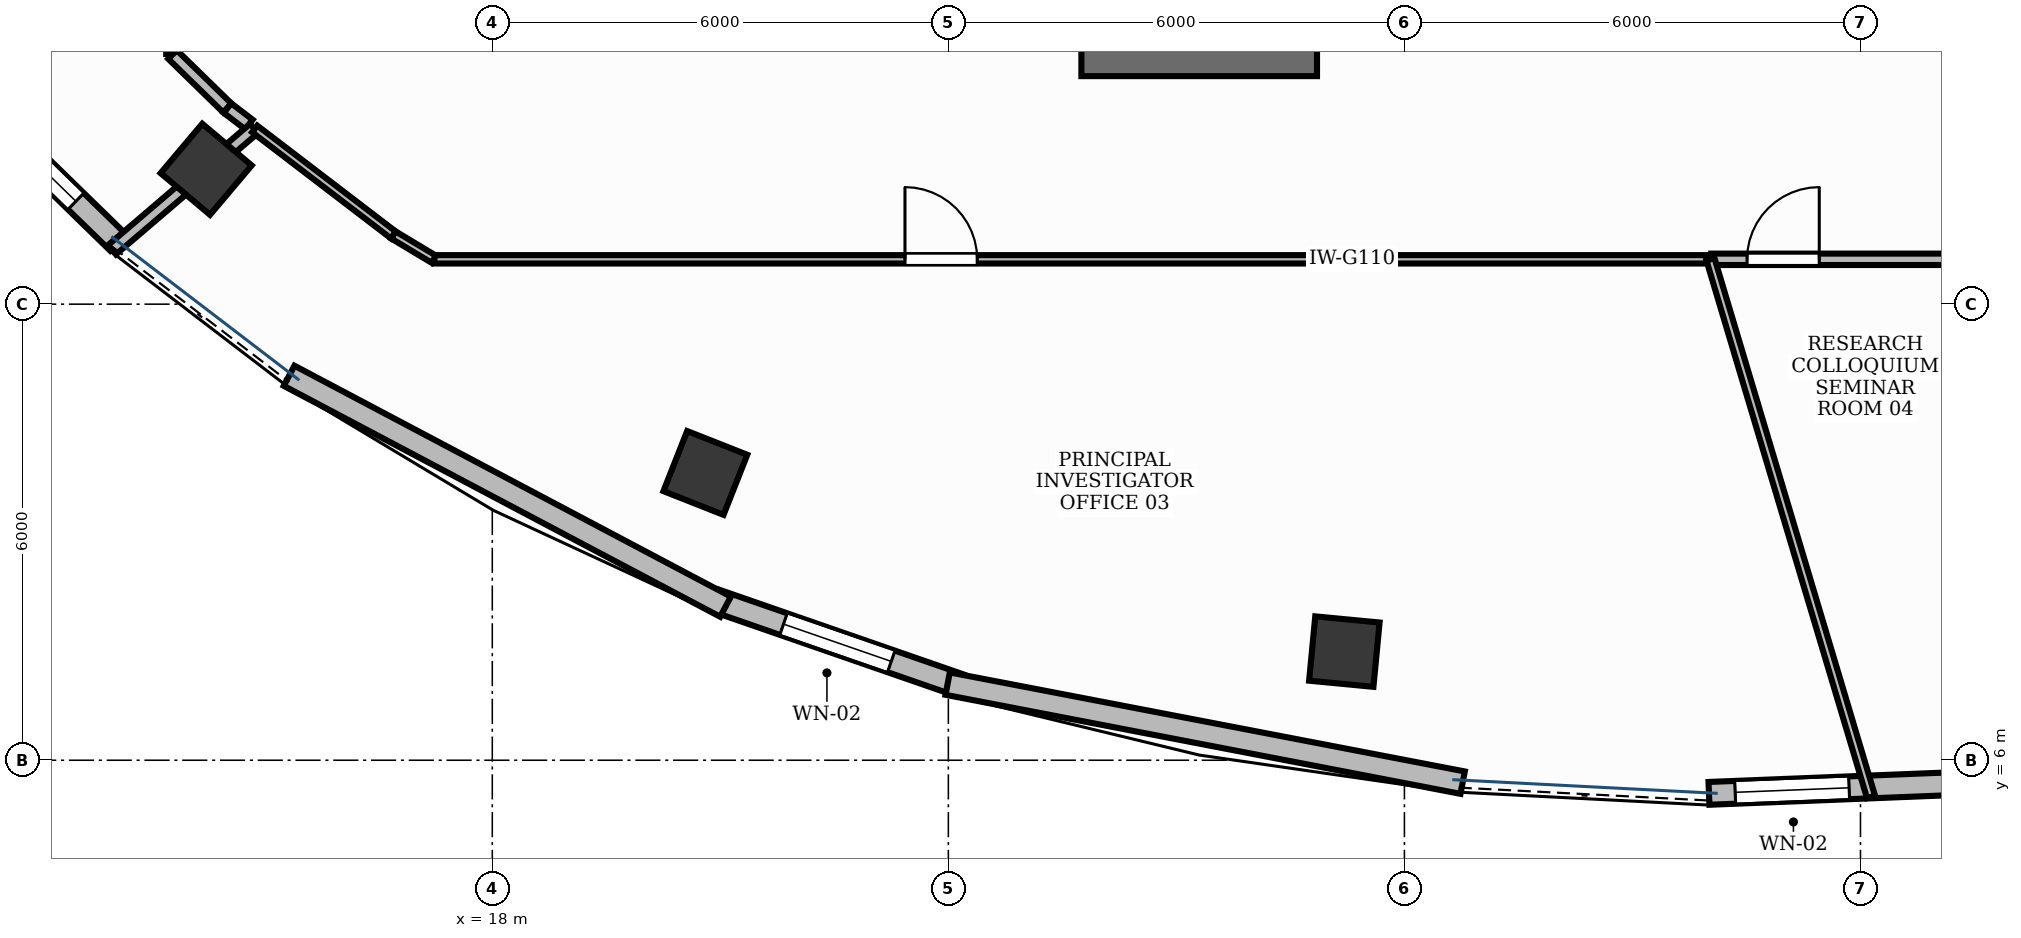
"""IFC4 building model, lengths in metres.
Left out: names, types, materials, properties, quantities, classifications, styles, units other than length and angle.
Written with IfcOpenShell. Run it as: python <this file> out.ifc"""

import sys

from ifc_helpers import new_model, si_unit, direction, frame, frame_2d, origin, origin_2d, place, context, subcontext, project, spatial, rectangle, extrude, element, fill, save


model = new_model("IFC4")
c1 = context("Model", 3, precision=1e-05, world=origin(), true_north=direction((0.0, 1.0)))
c2 = subcontext(c1, "Body", "Model", "MODEL_VIEW")
j1 = project(units=[si_unit("LENGTHUNIT", "METRE"), si_unit("PLANEANGLEUNIT", "RADIAN")], contexts=[c1])
p1 = place(None, origin())
s1 = spatial("IfcSite", under=j1, at=p1, CompositionType="ELEMENT")
p2 = place(p1, origin())
s2 = spatial("IfcBuilding", under=s1, at=p2, CompositionType="ELEMENT")
p3 = place(p2, frame((0.0, 0.0, 243.6)))
s3 = spatial("IfcBuildingStorey", under=s2, at=p3, CompositionType="ELEMENT", Elevation=243.6)
p4 = place(p3, frame((25.75, 15.2, 0.0), z_axis=(0.0, 0.0, 1.0), x_axis=(1.0, 0.0, 0.0)))
e1 = element("IfcWall", 1, at=p4, inside=s3, PredefinedType="SHEAR", context=c2, shape_type="SweptSolid", body=[
    extrude(rectangle(XDim=3.1, YDim=0.4, at=frame_2d((1.55, 0.0))), origin(), (0.0, 0.0, 1.0), 3.9),
])
for number, where, z_axis, x_axis in (
    (2, (14.235, 13.775, -0.0), (0.0, 0.0, 1.0), (-0.764, 0.645, 0.0)),
    (3, (20.803, 9.78, -0.0), (0.0, 0.0, 1.0), (-0.93, 0.367, 0.0)),
    (4, (29.21, 7.429, -0.0), (0.0, 0.0, 1.0), (-0.995, 0.095, 0.0)),
):
    element("IfcColumn", number, at=place(p3, frame(where, z_axis=z_axis, x_axis=x_axis)), inside=s3, PredefinedType="COLUMN", context=c2, shape_type="SweptSolid", body=[
        extrude(rectangle(XDim=0.85, YDim=0.85, at=origin_2d()), origin(), (0.0, 0.0, 1.0), 3.901),
    ])
p5 = place(p3, frame((10.892, 14.943, 0.0), z_axis=(0.0, 0.0, 1.0), x_axis=(0.716005135245, -0.698095012375, 0.0)))
e5 = element("IfcWall", 5, at=p5, inside=s3, PredefinedType="STANDARD", context=c2, shape_type="SweptSolid", body=[
    extrude(rectangle(XDim=3.053, YDim=0.3, at=frame_2d((1.527, 0.0))), origin(), (0.0, 0.0, 1.0), 3.9),
])
p6 = place(p5, frame((0.777, 0.0, 0.95)))
e6 = element("IfcOpeningElement", 6, at=p6, cuts=e5, PredefinedType="OPENING", context=c2, shape_type="SweptSolid", body=[
    extrude(rectangle(XDim=1.5, YDim=1.8, at=frame_2d((0.75, 0.9))), frame((0.0, 0.165, 0.0), z_axis=(0.0, -1.0, 0.0), x_axis=(1.0, 0.0, 0.0)), (0.0, 0.0, 1.0), 0.33),
])
p7 = place(p3, frame((20.928, 8.104, 0.0), z_axis=(0.0, 0.0, 1.0), x_axis=(0.944837969822, -0.327538105849, 0.0)))
e7 = element("IfcWall", 7, at=p7, inside=s3, PredefinedType="STANDARD", context=c2, shape_type="SweptSolid", body=[
    extrude(rectangle(XDim=3.412, YDim=0.3, at=frame_2d((1.706, 0.0))), origin(), (0.0, 0.0, 1.0), 3.47),
])
p8 = place(p7, frame((0.956, 0.0, 0.95)))
e8 = element("IfcOpeningElement", 8, at=p8, cuts=e7, PredefinedType="OPENING", context=c2, shape_type="SweptSolid", body=[
    extrude(rectangle(XDim=1.5, YDim=1.8, at=frame_2d((0.75, 0.9))), frame((0.0, 0.165, 0.0), z_axis=(0.0, -1.0, 0.0), x_axis=(1.0, 0.0, 0.0)), (0.0, 0.0, 1.0), 0.33),
])
p9 = place(p3, frame((34.007, 5.564, 0.0), z_axis=(0.0, 0.0, 1.0), x_axis=(0.999212491376, 0.039678672827, 0.0)))
e9 = element("IfcWall", 9, at=p9, inside=s3, PredefinedType="STANDARD", context=c2, shape_type="SweptSolid", body=[
    extrude(rectangle(XDim=3.538, YDim=0.3, at=frame_2d((1.769, 0.0))), origin(), (0.0, 0.0, 1.0), 3.9),
])
p10 = place(p9, frame((0.345, 0.0, 0.95)))
e10 = element("IfcOpeningElement", 10, at=p10, cuts=e9, PredefinedType="OPENING", context=c2, shape_type="SweptSolid", body=[
    extrude(rectangle(XDim=1.5, YDim=1.8, at=frame_2d((0.75, 0.9))), frame((0.0, 0.165, 0.0), z_axis=(0.0, -1.0, 0.0), x_axis=(1.0, 0.0, 0.0)), (0.0, 0.0, 1.0), 0.33),
])
p11 = place(p3, frame((15.327, 11.058, 0.0), z_axis=(0.0, 0.0, 1.0), x_axis=(0.883907649271, -0.467661488216, 0.0)))
e11 = element("IfcWall", 11, at=p11, inside=s3, PredefinedType="STANDARD", context=c2, shape_type="SweptSolid", body=[
    extrude(rectangle(XDim=6.496, YDim=0.3, at=frame_2d((3.248, 0.0))), origin(), (0.0, 0.0, 1.0), 3.9),
])
p12 = place(p3, frame((23.991, 7.008, 0.0), z_axis=(0.0, 0.0, 1.0), x_axis=(0.982011242269, -0.188822456443, 0.0)))
e12 = element("IfcWall", 12, at=p12, inside=s3, PredefinedType="STANDARD", context=c2, shape_type="SweptSolid", body=[
    extrude(rectangle(XDim=6.899, YDim=0.3, at=frame_2d((3.45, 0.0))), origin(), (0.0, 0.0, 1.0), 3.47),
])
p13 = place(p3, frame((13.79, 27.117, 0.0), z_axis=(0.0, 0.0, 1.0), x_axis=(0.0, -1.0, 0.0)))
e13 = element("IfcWall", 13, at=p13, inside=s3, PredefinedType="PARTITIONING", context=c2, shape_type="SweptSolid", body=[
    extrude(rectangle(XDim=11.826, YDim=0.16, at=frame_2d((5.913, 0.0))), origin(), (0.0, 0.0, 1.0), 2.91),
])
p14 = place(p13, frame((5.174, 0.0, 0.0)))
e14 = element("IfcOpeningElement", 14, at=p14, cuts=e13, PredefinedType="OPENING", context=c2, shape_type="SweptSolid", body=[
    extrude(rectangle(XDim=0.95, YDim=2.15, at=frame_2d((0.475, 1.075))), frame((0.0, 0.095, 0.0), z_axis=(0.0, -1.0, 0.0), x_axis=(1.0, 0.0, 0.0)), (0.0, 0.0, 1.0), 0.19),
])
p15 = place(p3, frame((17.236, 12.59, 0.0), z_axis=(0.0, 0.0, 1.0), x_axis=(1.0, 0.0, 0.0)))
e15 = element("IfcWall", 15, at=p15, inside=s3, PredefinedType="MOVABLE", context=c2, shape_type="SweptSolid", body=[
    extrude(rectangle(XDim=16.791, YDim=0.11, at=frame_2d((8.396, 0.0))), origin(), (0.0, 0.0, 1.0), 2.91),
])
p16 = place(p15, frame((6.194, 0.0, 0.0)))
e16 = element("IfcOpeningElement", 16, at=p16, cuts=e15, PredefinedType="OPENING", context=c2, shape_type="SweptSolid", body=[
    extrude(rectangle(XDim=0.95, YDim=2.15, at=frame_2d((0.475, 1.075))), frame((0.0, 0.07, 0.0), z_axis=(0.0, -1.0, 0.0), x_axis=(1.0, 0.0, 0.0)), (0.0, 0.0, 1.0), 0.14),
])
p17 = place(p3, frame((34.037, 12.59, 0.0), z_axis=(0.0, 0.0, 1.0), x_axis=(1.0, 0.0, 0.0)))
e17 = element("IfcWall", 17, at=p17, inside=s3, PredefinedType="PARTITIONING", context=c2, shape_type="SweptSolid", body=[
    extrude(rectangle(XDim=3.461, YDim=0.15, at=frame_2d((1.73, 0.0))), origin(), (0.0, 0.0, 1.0), 2.91),
])
p18 = place(p17, frame((0.471, 0.0, 0.0)))
e18 = element("IfcOpeningElement", 18, at=p18, cuts=e17, PredefinedType="OPENING", context=c2, shape_type="SweptSolid", body=[
    extrude(rectangle(XDim=0.95, YDim=2.15, at=frame_2d((0.475, 1.075))), frame((0.0, 0.09, 0.0), z_axis=(0.0, -1.0, 0.0), x_axis=(1.0, 0.0, 0.0)), (0.0, 0.0, 1.0), 0.18),
])
p19 = place(p3, frame((13.793, 15.284, 0.0), z_axis=(0.0, 0.0, 1.0), x_axis=(0.7160122468, -0.698087718294, 0.0)))
e19 = element("IfcWall", 19, at=p19, inside=s3, PredefinedType="PARTITIONING", context=c2, shape_type="SweptSolid", body=[
    extrude(rectangle(XDim=1.008, YDim=0.16, at=frame_2d((0.504, 0.0))), origin(), (0.0, 0.0, 1.0), 2.91),
])
p20 = place(p3, frame((14.516, 14.58, 0.0), z_axis=(0.0, 0.0, 1.0), x_axis=(0.794124394036, -0.607755252381, 0.0)))
e20 = element("IfcWall", 20, at=p20, inside=s3, PredefinedType="PARTITIONING", context=c2, shape_type="SweptSolid", body=[
    extrude(rectangle(XDim=0.356, YDim=0.16, at=frame_2d((0.178, 0.0))), origin(), (0.0, 0.0, 1.0), 2.91),
])
p21 = place(p3, frame((14.866, 14.312, 0.0), z_axis=(0.0, 0.0, 1.0), x_axis=(-0.760432930585, -0.649416475062, 0.0)))
e21 = element("IfcWall", 21, at=p21, inside=s3, PredefinedType="PARTITIONING", context=c2, shape_type="SweptSolid", body=[
    extrude(rectangle(XDim=2.459, YDim=0.16, at=frame_2d((1.229, 0.0))), origin(), (0.0, 0.0, 1.0), 2.91),
])
p22 = place(p3, frame((14.874, 14.306, 0.0), z_axis=(0.0, 0.0, 1.0), x_axis=(0.794366882066, -0.607438273965, 0.0)))
e22 = element("IfcWall", 22, at=p22, inside=s3, PredefinedType="MOVABLE", context=c2, shape_type="SweptSolid", body=[
    extrude(rectangle(XDim=2.297, YDim=0.11, at=frame_2d((1.149, 0.0))), origin(), (0.0, 0.0, 1.0), 2.91),
])
p23 = place(p3, frame((16.7, 12.91, 0.0), z_axis=(0.0, 0.0, 1.0), x_axis=(0.857458106414, -0.514553783141, 0.0)))
e23 = element("IfcWall", 23, at=p23, inside=s3, PredefinedType="MOVABLE", context=c2, shape_type="SweptSolid", body=[
    extrude(rectangle(XDim=0.619, YDim=0.11, at=frame_2d((0.309, 0.0))), origin(), (0.0, 0.0, 1.0), 2.91),
])
p24 = place(p3, frame((34.027, 12.59, 0.0), z_axis=(0.0, 0.0, 1.0), x_axis=(0.286155182725, -0.958183286955, 0.0)))
e24 = element("IfcWall", 24, at=p24, inside=s3, PredefinedType="MOVABLE", context=c2, shape_type="SweptSolid", body=[
    extrude(rectangle(XDim=7.382, YDim=0.11, at=frame_2d((3.691, 0.0))), origin(), (0.0, 0.0, 1.0), 2.91),
])
p25 = place(p6, origin())
e25 = element("IfcWindow", 25, at=p25, inside=s3, PartitioningType="DOUBLE_PANEL_VERTICAL", PredefinedType="WINDOW", context=c2, shape_type="SweptSolid", body=[
    extrude(rectangle(XDim=1.5, YDim=1.8, at=frame_2d((0.75, 0.9))), frame((0.0, 0.03, 0.0), z_axis=(0.0, -1.0, 0.0), x_axis=(1.0, 0.0, 0.0)), (0.0, 0.0, 1.0), 0.06),
])
fill(e6, e25)
p26 = place(p8, origin())
e26 = element("IfcWindow", 26, at=p26, inside=s3, PartitioningType="DOUBLE_PANEL_VERTICAL", PredefinedType="WINDOW", context=c2, shape_type="SweptSolid", body=[
    extrude(rectangle(XDim=1.5, YDim=1.8, at=frame_2d((0.75, 0.9))), frame((0.0, 0.03, 0.0), z_axis=(0.0, -1.0, 0.0), x_axis=(1.0, 0.0, 0.0)), (0.0, 0.0, 1.0), 0.06),
])
fill(e8, e26)
p27 = place(p10, origin())
e27 = element("IfcWindow", 27, at=p27, inside=s3, PartitioningType="DOUBLE_PANEL_VERTICAL", PredefinedType="WINDOW", context=c2, shape_type="SweptSolid", body=[
    extrude(rectangle(XDim=1.5, YDim=1.8, at=frame_2d((0.75, 0.9))), frame((0.0, 0.03, 0.0), z_axis=(0.0, -1.0, 0.0), x_axis=(1.0, 0.0, 0.0)), (0.0, 0.0, 1.0), 0.06),
])
fill(e10, e27)
p28 = place(p16, origin())
e28 = element("IfcDoor", 28, at=p28, inside=s3, OperationType="SINGLE_SWING_LEFT", PredefinedType="DOOR", context=c2, shape_type="SweptSolid", body=[
    extrude(rectangle(XDim=0.95, YDim=2.15, at=frame_2d((0.475, 1.075))), frame((0.0, 0.025, 0.0), z_axis=(0.0, -1.0, 0.0), x_axis=(1.0, 0.0, 0.0)), (0.0, 0.0, 1.0), 0.05),
])
fill(e16, e28)
p29 = place(p18, origin())
e29 = element("IfcDoor", 29, at=p29, inside=s3, OperationType="SINGLE_SWING_RIGHT", PredefinedType="DOOR", context=c2, shape_type="SweptSolid", body=[
    extrude(rectangle(XDim=0.95, YDim=2.15, at=frame_2d((0.475, 1.075))), frame((0.0, 0.025, 0.0), z_axis=(0.0, -1.0, 0.0), x_axis=(1.0, 0.0, 0.0)), (0.0, 0.0, 1.0), 0.05),
])
fill(e18, e29)
save(model, sys.argv[1])
